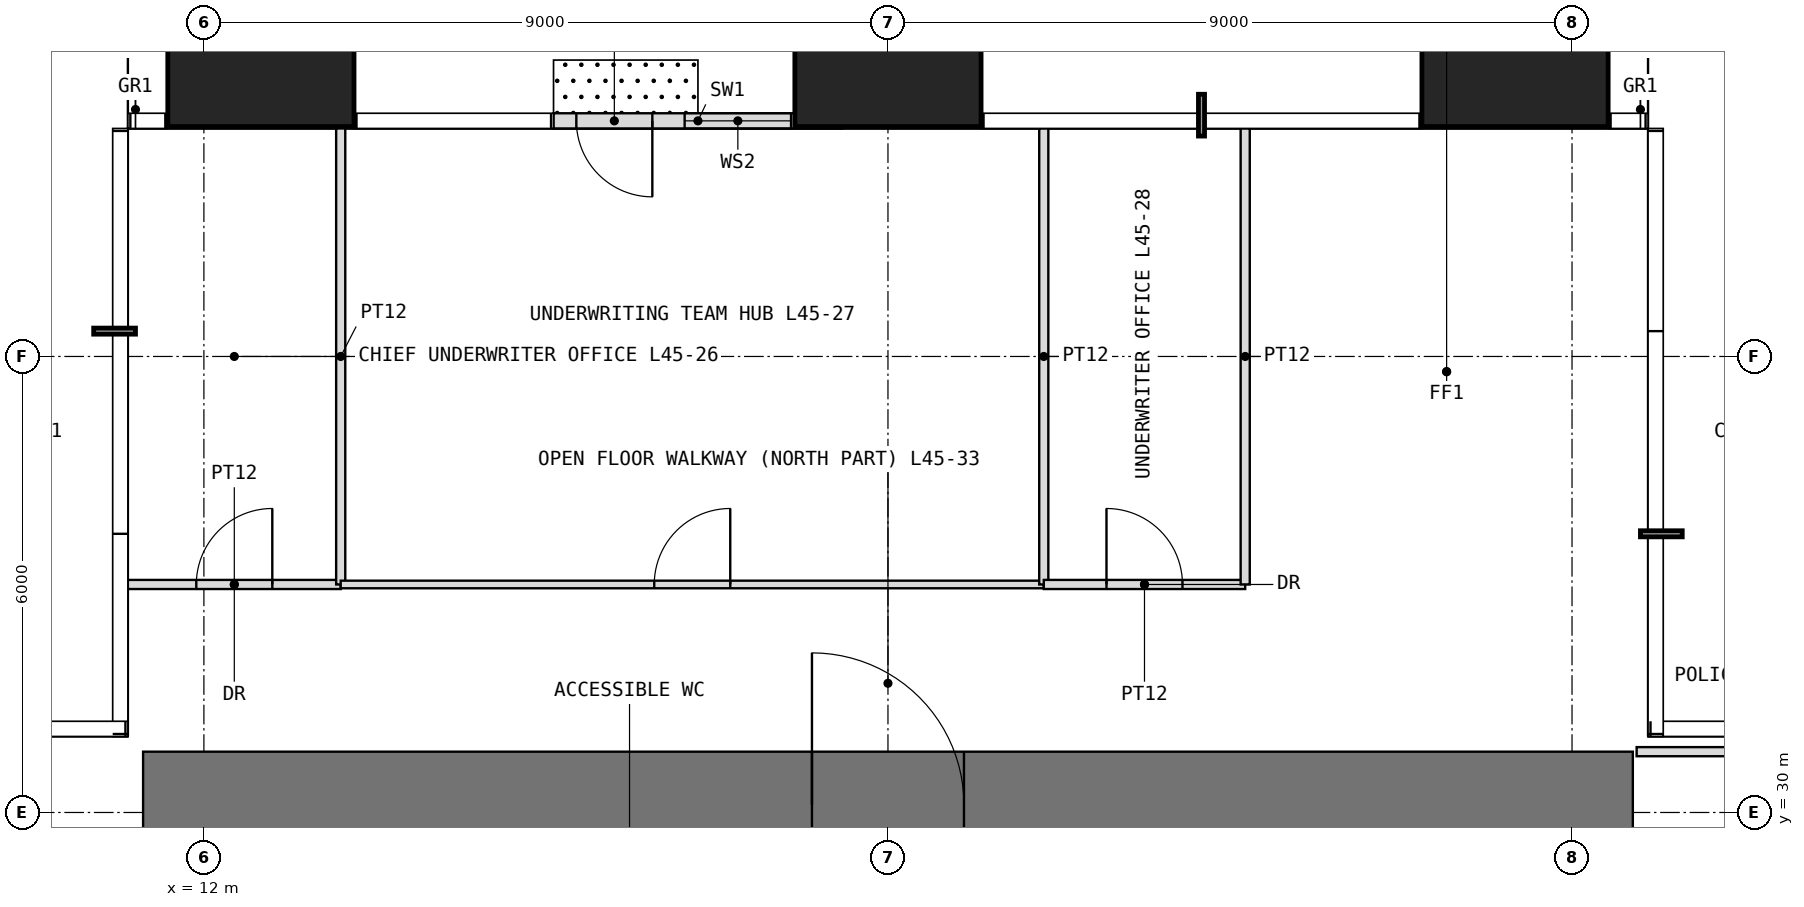
"""IFC4 building model, lengths in metres.
Left out: names, types, materials, properties, quantities, classifications, styles, units other than length and angle.
Written with IfcOpenShell. Run it as: python <this file> out.ifc"""

import sys

from ifc_helpers import new_model, si_unit, direction, frame, frame_2d, origin, origin_2d, place, context, subcontext, project, spatial, rectangle, extrude, element, fill, save


model = new_model("IFC4")
c1 = context("Model", 3, precision=1e-05, world=origin(), true_north=direction((0.0, 1.0)))
c2 = subcontext(c1, "Body", "Model", "MODEL_VIEW")
j1 = project(units=[si_unit("LENGTHUNIT", "METRE"), si_unit("PLANEANGLEUNIT", "RADIAN")], contexts=[c1])
p1 = place(None, origin())
s1 = spatial("IfcSite", under=j1, at=p1, CompositionType="ELEMENT")
p2 = place(p1, origin())
s2 = spatial("IfcBuilding", under=s1, at=p2, CompositionType="ELEMENT")
p3 = place(p2, frame((0.0, 0.0, 190.5)))
s3 = spatial("IfcBuildingStorey", under=s2, at=p3, CompositionType="ELEMENT", Elevation=190.5)
for number, where, z_axis, x_axis in (
    (1, (12.75, 40.25, 0.0), (0.0, 0.0, 1.0), (1.0, 0.0, 0.0)),
    (2, (21.0, 40.25, 0.0), (0.0, 0.0, 1.0), (1.0, 0.0, 0.0)),
    (3, (29.25, 40.25, 0.0), (0.0, 0.0, 1.0), (1.0, 0.0, 0.0)),
):
    element("IfcColumn", number, at=place(p3, frame(where, z_axis=z_axis, x_axis=x_axis)), inside=s3, PredefinedType="COLUMN", context=c2, shape_type="SweptSolid", body=[
        extrude(rectangle(XDim=2.45, YDim=2.45, at=origin_2d()), origin(), (0.0, 0.0, 1.0), 4.0),
    ])
p4 = place(p3, frame((20.4, 39.1, 0.0), z_axis=(0.0, 0.0, 1.0), x_axis=(-1.0, 0.0, 0.0)))
e4 = element("IfcWall", 4, at=p4, inside=s3, PredefinedType="USERDEFINED", context=c2, shape_type="SweptSolid", body=[
    extrude(rectangle(XDim=3.8, YDim=0.2, at=frame_2d((1.9, 0.0))), origin(), (0.0, 0.0, 1.0), 3.75),
])
p5 = place(p4, frame((2.5, 0.0, 0.0)))
e5 = element("IfcOpeningElement", 5, at=p5, cuts=e4, PredefinedType="OPENING", context=c2, shape_type="SweptSolid", body=[
    extrude(rectangle(XDim=1.0, YDim=2.4, at=frame_2d((0.5, 1.2))), frame((0.0, 0.11, 0.0), z_axis=(0.0, -1.0, 0.0), x_axis=(1.0, 0.0, 0.0)), (0.0, 0.0, 1.0), 0.22),
])
p6 = place(p4, frame((0.675, 0.0, 0.3)))
e6 = element("IfcOpeningElement", 6, at=p6, cuts=e4, PredefinedType="OPENING", context=c2, shape_type="SweptSolid", body=[
    extrude(rectangle(XDim=1.4, YDim=2.7, at=frame_2d((0.7, 1.35))), frame((0.0, 0.11, 0.0), z_axis=(0.0, -1.0, 0.0), x_axis=(1.0, 0.0, 0.0)), (0.0, 0.0, 1.0), 0.22),
])
p7 = place(p3, frame((11.2, 30.1, -0.05), z_axis=(0.0, 0.0, 1.0), x_axis=(1.0, 0.0, 0.0)))
e7 = element("IfcWall", 7, at=p7, inside=s3, PredefinedType="SHEAR", context=c2, shape_type="SweptSolid", body=[
    extrude(rectangle(XDim=19.6, YDim=1.4, at=frame_2d((9.8, 0.0))), origin(), (0.0, 0.0, 1.0), 4.0),
])
p8 = place(p7, frame((8.8, 0.0, 0.05)))
e8 = element("IfcOpeningElement", 8, at=p8, cuts=e7, PredefinedType="OPENING", context=c2, shape_type="SweptSolid", body=[
    extrude(rectangle(XDim=2.0, YDim=2.2, at=frame_2d((1.0, 1.1))), frame((0.0, 0.71, 0.0), z_axis=(0.0, -1.0, 0.0), x_axis=(1.0, 0.0, 0.0)), (0.0, 0.0, 1.0), 1.42),
])
p9 = place(p3, frame((11.0, 33.0, 0.0), z_axis=(0.0, 0.0, 1.0), x_axis=(1.0, 0.0, 0.0)))
e9 = element("IfcWall", 9, at=p9, inside=s3, PredefinedType="PARTITIONING", context=c2, shape_type="SweptSolid", body=[
    extrude(rectangle(XDim=2.8, YDim=0.12, at=frame_2d((1.4, 0.0))), origin(), (0.0, 0.0, 1.0), 3.75),
])
p10 = place(p9, frame((0.9, 0.0, 0.0)))
e10 = element("IfcOpeningElement", 10, at=p10, cuts=e9, PredefinedType="OPENING", context=c2, shape_type="SweptSolid", body=[
    extrude(rectangle(XDim=1.0, YDim=2.2, at=frame_2d((0.5, 1.1))), frame((0.0, 0.07, 0.0), z_axis=(0.0, -1.0, 0.0), x_axis=(1.0, 0.0, 0.0)), (0.0, 0.0, 1.0), 0.14),
])
p11 = place(p3, frame((13.8, 33.0, 0.0), z_axis=(0.0, 0.0, 1.0), x_axis=(0.0, 1.0, 0.0)))
e11 = element("IfcWall", 11, at=p11, inside=s3, PredefinedType="PARTITIONING", context=c2, shape_type="SweptSolid", body=[
    extrude(rectangle(XDim=6.0, YDim=0.12, at=frame_2d((3.0, 0.0))), origin(), (0.0, 0.0, 1.0), 3.75),
])
p12 = place(p3, frame((13.8, 33.0, 0.0), z_axis=(0.0, 0.0, 1.0), x_axis=(1.0, 0.0, 0.0)))
e12 = element("IfcWall", 12, at=p12, inside=s3, PredefinedType="PARTITIONING", context=c2, shape_type="SweptSolid", body=[
    extrude(rectangle(XDim=9.25, YDim=0.1, at=frame_2d((4.625, 0.0))), origin(), (0.0, 0.0, 1.0), 3.75),
])
p13 = place(p12, frame((4.125, 0.0, 0.0)))
e13 = element("IfcOpeningElement", 13, at=p13, cuts=e12, PredefinedType="OPENING", context=c2, shape_type="SweptSolid", body=[
    extrude(rectangle(XDim=1.0, YDim=2.4, at=frame_2d((0.5, 1.2))), frame((0.0, 0.06, 0.0), z_axis=(0.0, -1.0, 0.0), x_axis=(1.0, 0.0, 0.0)), (0.0, 0.0, 1.0), 0.12),
])
p14 = place(p3, frame((23.05, 33.0, 0.0), z_axis=(0.0, 0.0, 1.0), x_axis=(0.0, 1.0, 0.0)))
e14 = element("IfcWall", 14, at=p14, inside=s3, PredefinedType="PARTITIONING", context=c2, shape_type="SweptSolid", body=[
    extrude(rectangle(XDim=6.0, YDim=0.12, at=frame_2d((3.0, 0.0))), origin(), (0.0, 0.0, 1.0), 3.75),
])
p15 = place(p3, frame((23.05, 33.0, 0.0), z_axis=(0.0, 0.0, 1.0), x_axis=(1.0, 0.0, 0.0)))
e15 = element("IfcWall", 15, at=p15, inside=s3, PredefinedType="PARTITIONING", context=c2, shape_type="SweptSolid", body=[
    extrude(rectangle(XDim=2.65, YDim=0.12, at=frame_2d((1.325, 0.0))), origin(), (0.0, 0.0, 1.0), 3.75),
])
p16 = place(p15, frame((0.825, 0.0, 0.0)))
e16 = element("IfcOpeningElement", 16, at=p16, cuts=e15, PredefinedType="OPENING", context=c2, shape_type="SweptSolid", body=[
    extrude(rectangle(XDim=1.0, YDim=2.2, at=frame_2d((0.5, 1.1))), frame((0.0, 0.07, 0.0), z_axis=(0.0, -1.0, 0.0), x_axis=(1.0, 0.0, 0.0)), (0.0, 0.0, 1.0), 0.14),
])
p17 = place(p3, frame((25.7, 33.0, 0.0), z_axis=(0.0, 0.0, 1.0), x_axis=(0.0, 1.0, 0.0)))
e17 = element("IfcWall", 17, at=p17, inside=s3, PredefinedType="PARTITIONING", context=c2, shape_type="SweptSolid", body=[
    extrude(rectangle(XDim=6.0, YDim=0.12, at=frame_2d((3.0, 0.0))), origin(), (0.0, 0.0, 1.0), 3.75),
])
p18 = place(p3, frame((30.85, 30.8, 0.0), z_axis=(0.0, 0.0, 1.0), x_axis=(1.0, 0.0, 0.0)))
e18 = element("IfcWall", 18, at=p18, inside=s3, PredefinedType="PARTITIONING", context=c2, shape_type="SweptSolid", body=[
    extrude(rectangle(XDim=4.25, YDim=0.12, at=frame_2d((2.125, 0.0))), origin(), (0.0, 0.0, 1.0), 3.75),
])
p19 = place(p5, origin())
e19 = element("IfcDoor", 19, at=p19, inside=s3, OperationType="SINGLE_SWING_LEFT", PredefinedType="DOOR", context=c2, shape_type="SweptSolid", body=[
    extrude(rectangle(XDim=1.0, YDim=2.4, at=frame_2d((0.5, 1.2))), frame((0.0, 0.025, 0.0), z_axis=(0.0, -1.0, 0.0), x_axis=(1.0, 0.0, 0.0)), (0.0, 0.0, 1.0), 0.05),
])
fill(e5, e19)
p20 = place(p6, origin())
e20 = element("IfcWindow", 20, at=p20, inside=s3, PartitioningType="SINGLE_PANEL", PredefinedType="WINDOW", context=c2, shape_type="SweptSolid", body=[
    extrude(rectangle(XDim=1.4, YDim=2.7, at=frame_2d((0.7, 1.35))), frame((0.0, 0.03, 0.0), z_axis=(0.0, -1.0, 0.0), x_axis=(1.0, 0.0, 0.0)), (0.0, 0.0, 1.0), 0.06),
])
fill(e6, e20)
p21 = place(p8, origin())
e21 = element("IfcDoor", 21, at=p21, inside=s3, OperationType="DOUBLE_DOOR_SINGLE_SWING", PredefinedType="DOOR", context=c2, shape_type="SweptSolid", body=[
    extrude(rectangle(XDim=2.0, YDim=2.2, at=frame_2d((1.0, 1.1))), frame((0.0, 0.025, 0.0), z_axis=(0.0, -1.0, 0.0), x_axis=(1.0, 0.0, 0.0)), (0.0, 0.0, 1.0), 0.05),
])
fill(e8, e21)
p22 = place(p10, origin())
e22 = element("IfcDoor", 22, at=p22, inside=s3, OperationType="SINGLE_SWING_RIGHT", PredefinedType="DOOR", context=c2, shape_type="SweptSolid", body=[
    extrude(rectangle(XDim=1.0, YDim=2.2, at=frame_2d((0.5, 1.1))), frame((0.0, 0.025, 0.0), z_axis=(0.0, -1.0, 0.0), x_axis=(1.0, 0.0, 0.0)), (0.0, 0.0, 1.0), 0.05),
])
fill(e10, e22)
p23 = place(p13, origin())
e23 = element("IfcDoor", 23, at=p23, inside=s3, OperationType="SINGLE_SWING_RIGHT", PredefinedType="DOOR", context=c2, shape_type="SweptSolid", body=[
    extrude(rectangle(XDim=1.0, YDim=2.4, at=frame_2d((0.5, 1.2))), frame((0.0, 0.025, 0.0), z_axis=(0.0, -1.0, 0.0), x_axis=(1.0, 0.0, 0.0)), (0.0, 0.0, 1.0), 0.05),
])
fill(e13, e23)
p24 = place(p16, origin())
e24 = element("IfcDoor", 24, at=p24, inside=s3, OperationType="SINGLE_SWING_LEFT", PredefinedType="DOOR", context=c2, shape_type="SweptSolid", body=[
    extrude(rectangle(XDim=1.0, YDim=2.2, at=frame_2d((0.5, 1.1))), frame((0.0, 0.025, 0.0), z_axis=(0.0, -1.0, 0.0), x_axis=(1.0, 0.0, 0.0)), (0.0, 0.0, 1.0), 0.05),
])
fill(e16, e24)
save(model, sys.argv[1])
